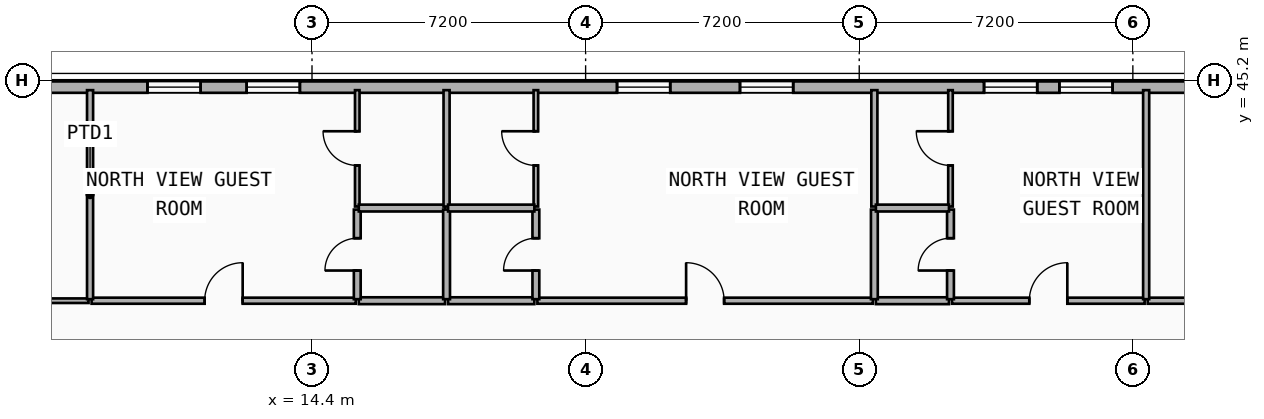
"""IFC4 building model, lengths in metres.
Left out: names, types, materials, properties, quantities, classifications, styles, units other than length and angle.
Written with IfcOpenShell. Run it as: python <this file> out.ifc"""

import sys

from ifc_helpers import new_model, si_unit, direction, frame, frame_2d, origin, place, context, subcontext, project, spatial, rectangle, extrude, element, fill, save


model = new_model("IFC4")
c1 = context("Model", 3, precision=1e-05, world=origin(), true_north=direction((0.0, 1.0)))
c2 = subcontext(c1, "Body", "Model", "MODEL_VIEW")
j1 = project(units=[si_unit("LENGTHUNIT", "METRE"), si_unit("PLANEANGLEUNIT", "RADIAN")], contexts=[c1])
p1 = place(None, origin())
s1 = spatial("IfcSite", under=j1, at=p1, CompositionType="ELEMENT")
p2 = place(p1, origin())
s2 = spatial("IfcBuilding", under=s1, at=p2, CompositionType="ELEMENT")
p3 = place(p2, frame((0.0, 0.0, 39.5)))
s3 = spatial("IfcBuildingStorey", under=s2, at=p3, CompositionType="ELEMENT", Elevation=39.5)
p4 = place(p3, frame((4.2, 45.02, 0.0), z_axis=(0.0, 0.0, 1.0), x_axis=(1.0, 0.0, 0.0)))
e1 = element("IfcWall", 1, at=p4, inside=s3, PredefinedType="SOLIDWALL", context=c2, shape_type="SweptSolid", body=[
    extrude(rectangle(XDim=49.2, YDim=0.3, at=frame_2d((24.6, 0.0))), origin(), (0.0, 0.0, 1.0), 3.24),
])
p5 = place(p4, frame((5.87, 0.0, 0.85)))
e2 = element("IfcOpeningElement", 2, at=p5, cuts=e1, PredefinedType="OPENING", context=c2, shape_type="SweptSolid", body=[
    extrude(rectangle(XDim=1.4, YDim=1.8, at=frame_2d((0.7, 0.9))), frame((0.0, 0.16, 0.0), z_axis=(0.0, -1.0, 0.0), x_axis=(1.0, 0.0, 0.0)), (0.0, 0.0, 1.0), 0.32),
])
p6 = place(p4, frame((8.481, 0.0, 0.85)))
e3 = element("IfcOpeningElement", 3, at=p6, cuts=e1, PredefinedType="OPENING", context=c2, shape_type="SweptSolid", body=[
    extrude(rectangle(XDim=1.4, YDim=1.8, at=frame_2d((0.7, 0.9))), frame((0.0, 0.16, 0.0), z_axis=(0.0, -1.0, 0.0), x_axis=(1.0, 0.0, 0.0)), (0.0, 0.0, 1.0), 0.32),
])
p7 = place(p4, frame((18.227, 0.0, 0.85)))
e4 = element("IfcOpeningElement", 4, at=p7, cuts=e1, PredefinedType="OPENING", context=c2, shape_type="SweptSolid", body=[
    extrude(rectangle(XDim=1.4, YDim=1.8, at=frame_2d((0.7, 0.9))), frame((0.0, 0.16, 0.0), z_axis=(0.0, -1.0, 0.0), x_axis=(1.0, 0.0, 0.0)), (0.0, 0.0, 1.0), 0.32),
])
p8 = place(p4, frame((21.462, 0.0, 0.85)))
e5 = element("IfcOpeningElement", 5, at=p8, cuts=e1, PredefinedType="OPENING", context=c2, shape_type="SweptSolid", body=[
    extrude(rectangle(XDim=1.4, YDim=1.8, at=frame_2d((0.7, 0.9))), frame((0.0, 0.16, 0.0), z_axis=(0.0, -1.0, 0.0), x_axis=(1.0, 0.0, 0.0)), (0.0, 0.0, 1.0), 0.32),
])
p9 = place(p4, frame((27.884, 0.0, 0.85)))
e6 = element("IfcOpeningElement", 6, at=p9, cuts=e1, PredefinedType="OPENING", context=c2, shape_type="SweptSolid", body=[
    extrude(rectangle(XDim=1.4, YDim=1.8, at=frame_2d((0.7, 0.9))), frame((0.0, 0.16, 0.0), z_axis=(0.0, -1.0, 0.0), x_axis=(1.0, 0.0, 0.0)), (0.0, 0.0, 1.0), 0.32),
])
p10 = place(p4, frame((29.867, 0.0, 0.85)))
e7 = element("IfcOpeningElement", 7, at=p10, cuts=e1, PredefinedType="OPENING", context=c2, shape_type="SweptSolid", body=[
    extrude(rectangle(XDim=1.4, YDim=1.8, at=frame_2d((0.7, 0.9))), frame((0.0, 0.16, 0.0), z_axis=(0.0, -1.0, 0.0), x_axis=(1.0, 0.0, 0.0)), (0.0, 0.0, 1.0), 0.32),
])
p11 = place(p4, frame((33.55, 0.0, 0.85)))
e8 = element("IfcOpeningElement", 8, at=p11, cuts=e1, PredefinedType="OPENING", context=c2, shape_type="SweptSolid", body=[
    extrude(rectangle(XDim=1.4, YDim=1.8, at=frame_2d((0.7, 0.9))), frame((0.0, 0.16, 0.0), z_axis=(0.0, -1.0, 0.0), x_axis=(1.0, 0.0, 0.0)), (0.0, 0.0, 1.0), 0.32),
])
p12 = place(p4, frame((36.05, 0.0, 0.85)))
e9 = element("IfcOpeningElement", 9, at=p12, cuts=e1, PredefinedType="OPENING", context=c2, shape_type="SweptSolid", body=[
    extrude(rectangle(XDim=1.4, YDim=1.8, at=frame_2d((0.7, 0.9))), frame((0.0, 0.16, 0.0), z_axis=(0.0, -1.0, 0.0), x_axis=(1.0, 0.0, 0.0)), (0.0, 0.0, 1.0), 0.32),
])
p13 = place(p4, frame((44.593, 0.0, 0.85)))
e10 = element("IfcOpeningElement", 10, at=p13, cuts=e1, PredefinedType="OPENING", context=c2, shape_type="SweptSolid", body=[
    extrude(rectangle(XDim=1.4, YDim=1.8, at=frame_2d((0.7, 0.9))), frame((0.0, 0.16, 0.0), z_axis=(0.0, -1.0, 0.0), x_axis=(1.0, 0.0, 0.0)), (0.0, 0.0, 1.0), 0.32),
])
p14 = place(p4, frame((46.737, 0.0, 0.85)))
e11 = element("IfcOpeningElement", 11, at=p14, cuts=e1, PredefinedType="OPENING", context=c2, shape_type="SweptSolid", body=[
    extrude(rectangle(XDim=1.4, YDim=1.8, at=frame_2d((0.7, 0.9))), frame((0.0, 0.16, 0.0), z_axis=(0.0, -1.0, 0.0), x_axis=(1.0, 0.0, 0.0)), (0.0, 0.0, 1.0), 0.32),
])
p15 = place(p3, frame((0.26, 39.4, 0.0), z_axis=(0.0, 0.0, 1.0), x_axis=(1.0, 0.0, 0.0)))
e12 = element("IfcWall", 12, at=p15, inside=s3, PredefinedType="PARTITIONING", context=c2, shape_type="SweptSolid", body=[
    extrude(rectangle(XDim=8.26, YDim=0.12, at=frame_2d((4.13, 0.0))), origin(), (0.0, 0.0, 1.0), 3.24),
])
p16 = place(p15, frame((3.68, 0.0, 0.0)))
e13 = element("IfcOpeningElement", 13, at=p16, cuts=e12, PredefinedType="OPENING", context=c2, shape_type="SweptSolid", body=[
    extrude(rectangle(XDim=0.9, YDim=2.1, at=frame_2d((0.45, 1.05))), frame((0.0, 0.07, 0.0), z_axis=(0.0, -1.0, 0.0), x_axis=(1.0, 0.0, 0.0)), (0.0, 0.0, 1.0), 0.14),
])
p17 = place(p3, frame((8.6, 39.4, 0.0), z_axis=(0.0, 0.0, 1.0), x_axis=(1.0, 0.0, 0.0)))
e14 = element("IfcWall", 14, at=p17, inside=s3, PredefinedType="PARTITIONING", context=c2, shape_type="SweptSolid", body=[
    extrude(rectangle(XDim=6.951, YDim=0.16, at=frame_2d((3.476, 0.0))), origin(), (0.0, 0.0, 1.0), 3.24),
])
p18 = place(p17, frame((2.976, 0.0, 0.0)))
e15 = element("IfcOpeningElement", 15, at=p18, cuts=e14, PredefinedType="OPENING", context=c2, shape_type="SweptSolid", body=[
    extrude(rectangle(XDim=1.0, YDim=2.15, at=frame_2d((0.5, 1.075))), frame((0.0, 0.09, 0.0), z_axis=(0.0, -1.0, 0.0), x_axis=(1.0, 0.0, 0.0)), (0.0, 0.0, 1.0), 0.18),
])
p19 = place(p3, frame((15.631, 39.4, 0.0), z_axis=(0.0, 0.0, 1.0), x_axis=(1.0, 0.0, 0.0)))
e16 = element("IfcWall", 16, at=p19, inside=s3, PredefinedType="PLUMBINGWALL", context=c2, shape_type="SweptSolid", body=[
    extrude(rectangle(XDim=2.27, YDim=0.18, at=frame_2d((1.135, 0.0))), origin(), (0.0, 0.0, 1.0), 3.24),
])
p20 = place(p3, frame((20.331, 39.4, 0.0), z_axis=(0.0, 0.0, 1.0), x_axis=(1.0, 0.0, 0.0)))
e17 = element("IfcWall", 17, at=p20, inside=s3, PredefinedType="PARTITIONING", context=c2, shape_type="SweptSolid", body=[
    extrude(rectangle(XDim=8.827, YDim=0.16, at=frame_2d((4.414, 0.0))), origin(), (0.0, 0.0, 1.0), 3.24),
])
p21 = place(p20, frame((3.914, 0.0, 0.0)))
e18 = element("IfcOpeningElement", 18, at=p21, cuts=e17, PredefinedType="OPENING", context=c2, shape_type="SweptSolid", body=[
    extrude(rectangle(XDim=1.0, YDim=2.15, at=frame_2d((0.5, 1.075))), frame((0.0, 0.09, 0.0), z_axis=(0.0, -1.0, 0.0), x_axis=(1.0, 0.0, 0.0)), (0.0, 0.0, 1.0), 0.18),
])
p22 = place(p3, frame((17.981, 39.4, 0.0), z_axis=(0.0, 0.0, 1.0), x_axis=(1.0, 0.0, 0.0)))
e19 = element("IfcWall", 19, at=p22, inside=s3, PredefinedType="PLUMBINGWALL", context=c2, shape_type="SweptSolid", body=[
    extrude(rectangle(XDim=2.27, YDim=0.18, at=frame_2d((1.135, 0.0))), origin(), (0.0, 0.0, 1.0), 3.24),
])
p23 = place(p3, frame((31.241, 39.4, 0.0), z_axis=(0.0, 0.0, 1.0), x_axis=(1.0, 0.0, 0.0)))
e20 = element("IfcWall", 20, at=p23, inside=s3, PredefinedType="PARTITIONING", context=c2, shape_type="SweptSolid", body=[
    extrude(rectangle(XDim=5.069, YDim=0.16, at=frame_2d((2.535, 0.0))), origin(), (0.0, 0.0, 1.0), 3.24),
])
p24 = place(p23, frame((2.034, 0.0, 0.0)))
e21 = element("IfcOpeningElement", 21, at=p24, cuts=e20, PredefinedType="OPENING", context=c2, shape_type="SweptSolid", body=[
    extrude(rectangle(XDim=1.0, YDim=2.15, at=frame_2d((0.5, 1.075))), frame((0.0, 0.09, 0.0), z_axis=(0.0, -1.0, 0.0), x_axis=(1.0, 0.0, 0.0)), (0.0, 0.0, 1.0), 0.18),
])
p25 = place(p3, frame((29.238, 39.4, 0.0), z_axis=(0.0, 0.0, 1.0), x_axis=(1.0, 0.0, 0.0)))
e22 = element("IfcWall", 22, at=p25, inside=s3, PredefinedType="PLUMBINGWALL", context=c2, shape_type="SweptSolid", body=[
    extrude(rectangle(XDim=1.923, YDim=0.18, at=frame_2d((0.961, 0.0))), origin(), (0.0, 0.0, 1.0), 3.24),
])
p26 = place(p3, frame((36.39, 39.4, 0.0), z_axis=(0.0, 0.0, 1.0), x_axis=(1.0, 0.0, 0.0)))
e23 = element("IfcWall", 23, at=p26, inside=s3, PredefinedType="PARTITIONING", context=c2, shape_type="SweptSolid", body=[
    extrude(rectangle(XDim=6.62, YDim=0.16, at=frame_2d((3.31, 0.0))), origin(), (0.0, 0.0, 1.0), 3.24),
])
p27 = place(p26, frame((2.81, 0.0, 0.0)))
e24 = element("IfcOpeningElement", 24, at=p27, cuts=e23, PredefinedType="OPENING", context=c2, shape_type="SweptSolid", body=[
    extrude(rectangle(XDim=1.0, YDim=2.15, at=frame_2d((0.5, 1.075))), frame((0.0, 0.09, 0.0), z_axis=(0.0, -1.0, 0.0), x_axis=(1.0, 0.0, 0.0)), (0.0, 0.0, 1.0), 0.18),
])
p28 = place(p3, frame((8.56, 39.44, 0.0), z_axis=(0.0, 0.0, 1.0), x_axis=(0.0, 1.0, 0.0)))
e25 = element("IfcWall", 25, at=p28, inside=s3, PredefinedType="PARTITIONING", context=c2, shape_type="SweptSolid", body=[
    extrude(rectangle(XDim=5.5, YDim=0.16, at=frame_2d((2.75, 0.0))), origin(), (0.0, 0.0, 1.0), 3.24),
])
p29 = place(p3, frame((15.591, 39.44, 0.0), z_axis=(0.0, 0.0, 1.0), x_axis=(0.0, 1.0, 0.0)))
e26 = element("IfcWall", 26, at=p29, inside=s3, PredefinedType="PLUMBINGWALL", context=c2, shape_type="SweptSolid", body=[
    extrude(rectangle(XDim=2.358, YDim=0.18, at=frame_2d((1.179, 0.0))), origin(), (0.0, 0.0, 1.0), 3.24),
])
p30 = place(p29, frame((0.754, 0.0, 0.0)))
e27 = element("IfcOpeningElement", 27, at=p30, cuts=e26, PredefinedType="OPENING", context=c2, shape_type="SweptSolid", body=[
    extrude(rectangle(XDim=0.85, YDim=2.1, at=frame_2d((0.425, 1.05))), frame((0.0, 0.1, 0.0), z_axis=(0.0, -1.0, 0.0), x_axis=(1.0, 0.0, 0.0)), (0.0, 0.0, 1.0), 0.2),
])
p31 = place(p3, frame((15.591, 41.878, 0.0), z_axis=(0.0, 0.0, 1.0), x_axis=(0.0, 1.0, 0.0)))
e28 = element("IfcWall", 28, at=p31, inside=s3, PredefinedType="PARTITIONING", context=c2, shape_type="SweptSolid", body=[
    extrude(rectangle(XDim=3.062, YDim=0.12, at=frame_2d((1.531, 0.0))), origin(), (0.0, 0.0, 1.0), 3.24),
])
p32 = place(p31, frame((1.081, 0.0, 0.0)))
e29 = element("IfcOpeningElement", 29, at=p32, cuts=e28, PredefinedType="OPENING", context=c2, shape_type="SweptSolid", body=[
    extrude(rectangle(XDim=0.9, YDim=2.1, at=frame_2d((0.45, 1.05))), frame((0.0, 0.07, 0.0), z_axis=(0.0, -1.0, 0.0), x_axis=(1.0, 0.0, 0.0)), (0.0, 0.0, 1.0), 0.14),
])
p33 = place(p3, frame((15.631, 41.838, 0.0), z_axis=(0.0, 0.0, 1.0), x_axis=(1.0, 0.0, 0.0)))
e30 = element("IfcWall", 30, at=p33, inside=s3, PredefinedType="PLUMBINGWALL", context=c2, shape_type="SweptSolid", body=[
    extrude(rectangle(XDim=2.27, YDim=0.18, at=frame_2d((1.135, 0.0))), origin(), (0.0, 0.0, 1.0), 3.24),
])
p34 = place(p3, frame((17.941, 39.44, 0.0), z_axis=(0.0, 0.0, 1.0), x_axis=(0.0, 1.0, 0.0)))
e31 = element("IfcWall", 31, at=p34, inside=s3, PredefinedType="PLUMBINGWALL", context=c2, shape_type="SweptSolid", body=[
    extrude(rectangle(XDim=2.358, YDim=0.18, at=frame_2d((1.179, 0.0))), origin(), (0.0, 0.0, 1.0), 3.24),
])
p35 = place(p3, frame((17.941, 41.878, 0.0), z_axis=(0.0, 0.0, 1.0), x_axis=(0.0, 1.0, 0.0)))
e32 = element("IfcWall", 32, at=p35, inside=s3, PredefinedType="PARTITIONING", context=c2, shape_type="SweptSolid", body=[
    extrude(rectangle(XDim=3.062, YDim=0.16, at=frame_2d((1.531, 0.0))), origin(), (0.0, 0.0, 1.0), 3.24),
])
p36 = place(p3, frame((20.291, 39.44, 0.0), z_axis=(0.0, 0.0, 1.0), x_axis=(0.0, 1.0, 0.0)))
e33 = element("IfcWall", 33, at=p36, inside=s3, PredefinedType="PLUMBINGWALL", context=c2, shape_type="SweptSolid", body=[
    extrude(rectangle(XDim=2.358, YDim=0.18, at=frame_2d((1.179, 0.0))), origin(), (0.0, 0.0, 1.0), 3.24),
])
p37 = place(p36, frame((0.754, 0.0, 0.0)))
e34 = element("IfcOpeningElement", 34, at=p37, cuts=e33, PredefinedType="OPENING", context=c2, shape_type="SweptSolid", body=[
    extrude(rectangle(XDim=0.85, YDim=2.1, at=frame_2d((0.425, 1.05))), frame((0.0, 0.1, 0.0), z_axis=(0.0, -1.0, 0.0), x_axis=(1.0, 0.0, 0.0)), (0.0, 0.0, 1.0), 0.2),
])
p38 = place(p3, frame((20.291, 41.878, 0.0), z_axis=(0.0, 0.0, 1.0), x_axis=(0.0, 1.0, 0.0)))
e35 = element("IfcWall", 35, at=p38, inside=s3, PredefinedType="PARTITIONING", context=c2, shape_type="SweptSolid", body=[
    extrude(rectangle(XDim=3.062, YDim=0.12, at=frame_2d((1.531, 0.0))), origin(), (0.0, 0.0, 1.0), 3.24),
])
p39 = place(p38, frame((1.081, 0.0, 0.0)))
e36 = element("IfcOpeningElement", 36, at=p39, cuts=e35, PredefinedType="OPENING", context=c2, shape_type="SweptSolid", body=[
    extrude(rectangle(XDim=0.9, YDim=2.1, at=frame_2d((0.45, 1.05))), frame((0.0, 0.07, 0.0), z_axis=(0.0, -1.0, 0.0), x_axis=(1.0, 0.0, 0.0)), (0.0, 0.0, 1.0), 0.14),
])
p40 = place(p3, frame((29.198, 39.44, 0.0), z_axis=(0.0, 0.0, 1.0), x_axis=(0.0, 1.0, 0.0)))
e37 = element("IfcWall", 37, at=p40, inside=s3, PredefinedType="PLUMBINGWALL", context=c2, shape_type="SweptSolid", body=[
    extrude(rectangle(XDim=2.358, YDim=0.18, at=frame_2d((1.179, 0.0))), origin(), (0.0, 0.0, 1.0), 3.24),
])
p41 = place(p3, frame((29.198, 41.878, 0.0), z_axis=(0.0, 0.0, 1.0), x_axis=(0.0, 1.0, 0.0)))
e38 = element("IfcWall", 38, at=p41, inside=s3, PredefinedType="PARTITIONING", context=c2, shape_type="SweptSolid", body=[
    extrude(rectangle(XDim=3.062, YDim=0.16, at=frame_2d((1.531, 0.0))), origin(), (0.0, 0.0, 1.0), 3.24),
])
p42 = place(p3, frame((17.981, 41.838, 0.0), z_axis=(0.0, 0.0, 1.0), x_axis=(1.0, 0.0, 0.0)))
e39 = element("IfcWall", 39, at=p42, inside=s3, PredefinedType="PLUMBINGWALL", context=c2, shape_type="SweptSolid", body=[
    extrude(rectangle(XDim=2.27, YDim=0.18, at=frame_2d((1.135, 0.0))), origin(), (0.0, 0.0, 1.0), 3.24),
])
p43 = place(p3, frame((31.201, 39.44, 0.0), z_axis=(0.0, 0.0, 1.0), x_axis=(0.0, 1.0, 0.0)))
e40 = element("IfcWall", 40, at=p43, inside=s3, PredefinedType="PLUMBINGWALL", context=c2, shape_type="SweptSolid", body=[
    extrude(rectangle(XDim=2.358, YDim=0.18, at=frame_2d((1.179, 0.0))), origin(), (0.0, 0.0, 1.0), 3.24),
])
p44 = place(p43, frame((0.754, 0.0, 0.0)))
e41 = element("IfcOpeningElement", 41, at=p44, cuts=e40, PredefinedType="OPENING", context=c2, shape_type="SweptSolid", body=[
    extrude(rectangle(XDim=0.85, YDim=2.1, at=frame_2d((0.425, 1.05))), frame((0.0, 0.1, 0.0), z_axis=(0.0, -1.0, 0.0), x_axis=(1.0, 0.0, 0.0)), (0.0, 0.0, 1.0), 0.2),
])
p45 = place(p3, frame((31.201, 41.878, 0.0), z_axis=(0.0, 0.0, 1.0), x_axis=(0.0, 1.0, 0.0)))
e42 = element("IfcWall", 42, at=p45, inside=s3, PredefinedType="PARTITIONING", context=c2, shape_type="SweptSolid", body=[
    extrude(rectangle(XDim=3.062, YDim=0.12, at=frame_2d((1.531, 0.0))), origin(), (0.0, 0.0, 1.0), 3.24),
])
p46 = place(p45, frame((1.081, 0.0, 0.0)))
e43 = element("IfcOpeningElement", 43, at=p46, cuts=e42, PredefinedType="OPENING", context=c2, shape_type="SweptSolid", body=[
    extrude(rectangle(XDim=0.9, YDim=2.1, at=frame_2d((0.45, 1.05))), frame((0.0, 0.07, 0.0), z_axis=(0.0, -1.0, 0.0), x_axis=(1.0, 0.0, 0.0)), (0.0, 0.0, 1.0), 0.14),
])
p47 = place(p3, frame((36.35, 39.44, 0.0), z_axis=(0.0, 0.0, 1.0), x_axis=(0.0, 1.0, 0.0)))
e44 = element("IfcWall", 44, at=p47, inside=s3, PredefinedType="PARTITIONING", context=c2, shape_type="SweptSolid", body=[
    extrude(rectangle(XDim=5.5, YDim=0.16, at=frame_2d((2.75, 0.0))), origin(), (0.0, 0.0, 1.0), 3.24),
])
p48 = place(p3, frame((29.238, 41.838, 0.0), z_axis=(0.0, 0.0, 1.0), x_axis=(1.0, 0.0, 0.0)))
e45 = element("IfcWall", 45, at=p48, inside=s3, PredefinedType="PLUMBINGWALL", context=c2, shape_type="SweptSolid", body=[
    extrude(rectangle(XDim=1.923, YDim=0.18, at=frame_2d((0.961, 0.0))), origin(), (0.0, 0.0, 1.0), 3.24),
])
p49 = place(p5, origin())
e46 = element("IfcWindow", 46, at=p49, inside=s3, PartitioningType="SINGLE_PANEL", PredefinedType="WINDOW", context=c2, shape_type="SweptSolid", body=[
    extrude(rectangle(XDim=1.4, YDim=1.8, at=frame_2d((0.7, 0.9))), frame((0.0, 0.03, 0.0), z_axis=(0.0, -1.0, 0.0), x_axis=(1.0, 0.0, 0.0)), (0.0, 0.0, 1.0), 0.06),
])
fill(e2, e46)
p50 = place(p6, origin())
e47 = element("IfcWindow", 47, at=p50, inside=s3, PartitioningType="SINGLE_PANEL", PredefinedType="WINDOW", context=c2, shape_type="SweptSolid", body=[
    extrude(rectangle(XDim=1.4, YDim=1.8, at=frame_2d((0.7, 0.9))), frame((0.0, 0.03, 0.0), z_axis=(0.0, -1.0, 0.0), x_axis=(1.0, 0.0, 0.0)), (0.0, 0.0, 1.0), 0.06),
])
fill(e3, e47)
p51 = place(p7, origin())
e48 = element("IfcWindow", 48, at=p51, inside=s3, PartitioningType="SINGLE_PANEL", PredefinedType="WINDOW", context=c2, shape_type="SweptSolid", body=[
    extrude(rectangle(XDim=1.4, YDim=1.8, at=frame_2d((0.7, 0.9))), frame((0.0, 0.03, 0.0), z_axis=(0.0, -1.0, 0.0), x_axis=(1.0, 0.0, 0.0)), (0.0, 0.0, 1.0), 0.06),
])
fill(e4, e48)
p52 = place(p8, origin())
e49 = element("IfcWindow", 49, at=p52, inside=s3, PartitioningType="SINGLE_PANEL", PredefinedType="WINDOW", context=c2, shape_type="SweptSolid", body=[
    extrude(rectangle(XDim=1.4, YDim=1.8, at=frame_2d((0.7, 0.9))), frame((0.0, 0.03, 0.0), z_axis=(0.0, -1.0, 0.0), x_axis=(1.0, 0.0, 0.0)), (0.0, 0.0, 1.0), 0.06),
])
fill(e5, e49)
p53 = place(p9, origin())
e50 = element("IfcWindow", 50, at=p53, inside=s3, PartitioningType="SINGLE_PANEL", PredefinedType="WINDOW", context=c2, shape_type="SweptSolid", body=[
    extrude(rectangle(XDim=1.4, YDim=1.8, at=frame_2d((0.7, 0.9))), frame((0.0, 0.03, 0.0), z_axis=(0.0, -1.0, 0.0), x_axis=(1.0, 0.0, 0.0)), (0.0, 0.0, 1.0), 0.06),
])
fill(e6, e50)
p54 = place(p10, origin())
e51 = element("IfcWindow", 51, at=p54, inside=s3, PartitioningType="SINGLE_PANEL", PredefinedType="WINDOW", context=c2, shape_type="SweptSolid", body=[
    extrude(rectangle(XDim=1.4, YDim=1.8, at=frame_2d((0.7, 0.9))), frame((0.0, 0.03, 0.0), z_axis=(0.0, -1.0, 0.0), x_axis=(1.0, 0.0, 0.0)), (0.0, 0.0, 1.0), 0.06),
])
fill(e7, e51)
p55 = place(p18, origin())
e52 = element("IfcDoor", 52, at=p55, inside=s3, OperationType="SINGLE_SWING_RIGHT", PredefinedType="DOOR", context=c2, shape_type="SweptSolid", body=[
    extrude(rectangle(XDim=1.0, YDim=2.15, at=frame_2d((0.5, 1.075))), frame((0.0, 0.025, 0.0), z_axis=(0.0, -1.0, 0.0), x_axis=(1.0, 0.0, 0.0)), (0.0, 0.0, 1.0), 0.05),
])
fill(e15, e52)
p56 = place(p21, origin())
e53 = element("IfcDoor", 53, at=p56, inside=s3, OperationType="SINGLE_SWING_LEFT", PredefinedType="DOOR", context=c2, shape_type="SweptSolid", body=[
    extrude(rectangle(XDim=1.0, YDim=2.15, at=frame_2d((0.5, 1.075))), frame((0.0, 0.025, 0.0), z_axis=(0.0, -1.0, 0.0), x_axis=(1.0, 0.0, 0.0)), (0.0, 0.0, 1.0), 0.05),
])
fill(e18, e53)
p57 = place(p24, origin())
e54 = element("IfcDoor", 54, at=p57, inside=s3, OperationType="SINGLE_SWING_RIGHT", PredefinedType="DOOR", context=c2, shape_type="SweptSolid", body=[
    extrude(rectangle(XDim=1.0, YDim=2.15, at=frame_2d((0.5, 1.075))), frame((0.0, 0.025, 0.0), z_axis=(0.0, -1.0, 0.0), x_axis=(1.0, 0.0, 0.0)), (0.0, 0.0, 1.0), 0.05),
])
fill(e21, e54)
p58 = place(p30, origin())
e55 = element("IfcDoor", 55, at=p58, inside=s3, OperationType="SINGLE_SWING_LEFT", PredefinedType="DOOR", context=c2, shape_type="SweptSolid", body=[
    extrude(rectangle(XDim=0.85, YDim=2.1, at=frame_2d((0.425, 1.05))), frame((0.0, 0.025, 0.0), z_axis=(0.0, -1.0, 0.0), x_axis=(1.0, 0.0, 0.0)), (0.0, 0.0, 1.0), 0.05),
])
fill(e27, e55)
p59 = place(p32, origin())
e56 = element("IfcDoor", 56, at=p59, inside=s3, OperationType="SINGLE_SWING_RIGHT", PredefinedType="DOOR", context=c2, shape_type="SweptSolid", body=[
    extrude(rectangle(XDim=0.9, YDim=2.1, at=frame_2d((0.45, 1.05))), frame((0.0, 0.025, 0.0), z_axis=(0.0, -1.0, 0.0), x_axis=(1.0, 0.0, 0.0)), (0.0, 0.0, 1.0), 0.05),
])
fill(e29, e56)
p60 = place(p37, origin())
e57 = element("IfcDoor", 57, at=p60, inside=s3, OperationType="SINGLE_SWING_LEFT", PredefinedType="DOOR", context=c2, shape_type="SweptSolid", body=[
    extrude(rectangle(XDim=0.85, YDim=2.1, at=frame_2d((0.425, 1.05))), frame((0.0, 0.025, 0.0), z_axis=(0.0, -1.0, 0.0), x_axis=(1.0, 0.0, 0.0)), (0.0, 0.0, 1.0), 0.05),
])
fill(e34, e57)
p61 = place(p39, origin())
e58 = element("IfcDoor", 58, at=p61, inside=s3, OperationType="SINGLE_SWING_RIGHT", PredefinedType="DOOR", context=c2, shape_type="SweptSolid", body=[
    extrude(rectangle(XDim=0.9, YDim=2.1, at=frame_2d((0.45, 1.05))), frame((0.0, 0.025, 0.0), z_axis=(0.0, -1.0, 0.0), x_axis=(1.0, 0.0, 0.0)), (0.0, 0.0, 1.0), 0.05),
])
fill(e36, e58)
p62 = place(p44, origin())
e59 = element("IfcDoor", 59, at=p62, inside=s3, OperationType="SINGLE_SWING_LEFT", PredefinedType="DOOR", context=c2, shape_type="SweptSolid", body=[
    extrude(rectangle(XDim=0.85, YDim=2.1, at=frame_2d((0.425, 1.05))), frame((0.0, 0.025, 0.0), z_axis=(0.0, -1.0, 0.0), x_axis=(1.0, 0.0, 0.0)), (0.0, 0.0, 1.0), 0.05),
])
fill(e41, e59)
p63 = place(p46, origin())
e60 = element("IfcDoor", 60, at=p63, inside=s3, OperationType="SINGLE_SWING_RIGHT", PredefinedType="DOOR", context=c2, shape_type="SweptSolid", body=[
    extrude(rectangle(XDim=0.9, YDim=2.1, at=frame_2d((0.45, 1.05))), frame((0.0, 0.025, 0.0), z_axis=(0.0, -1.0, 0.0), x_axis=(1.0, 0.0, 0.0)), (0.0, 0.0, 1.0), 0.05),
])
fill(e43, e60)
save(model, sys.argv[1])
